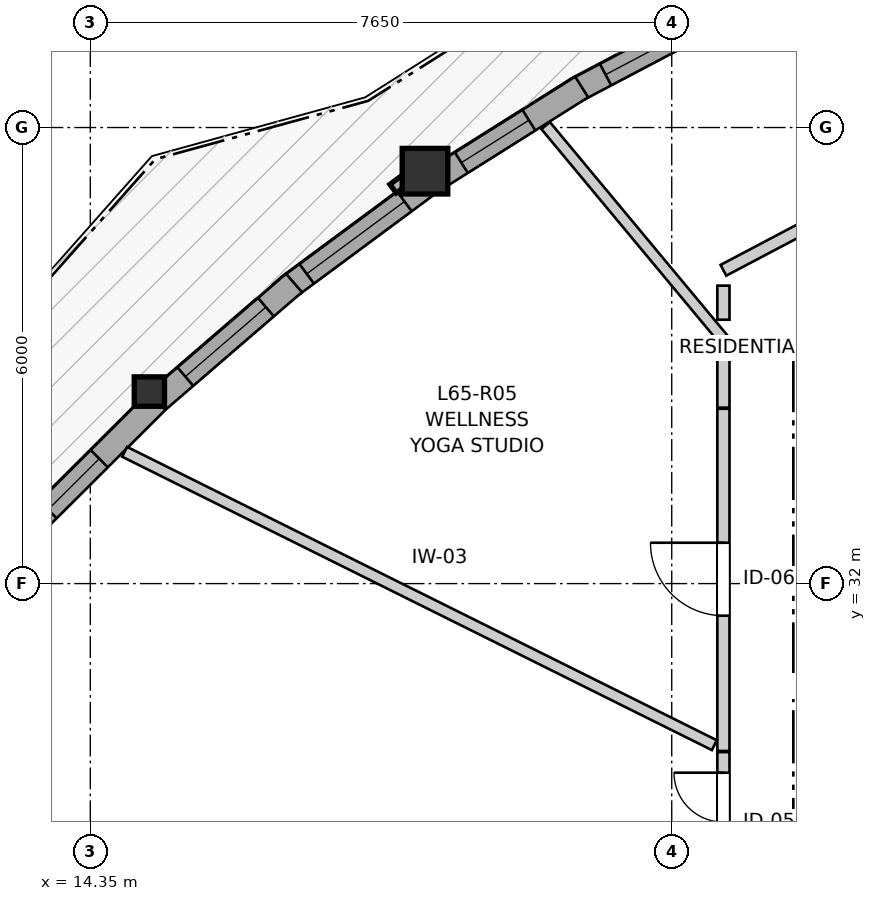
"""IFC4 building model, lengths in metres.
Left out: names, types, materials, properties, quantities, classifications, styles, units other than length and angle.
Written with IfcOpenShell. Run it as: python <this file> out.ifc"""

import sys

from ifc_helpers import new_model, si_unit, direction, frame, frame_2d, origin, origin_2d, place, context, subcontext, project, spatial, rectangle, i_section, extrude, source, transform, mapped, element, fill, save


model = new_model("IFC4")
c1 = context("Model", 3, precision=1e-05, world=origin(), true_north=direction((0.0, 1.0)))
c2 = subcontext(c1, "Body", "Model", "MODEL_VIEW")
j1 = project(units=[si_unit("LENGTHUNIT", "METRE"), si_unit("PLANEANGLEUNIT", "RADIAN")], contexts=[c1])
p1 = place(None, origin())
s1 = spatial("IfcSite", under=j1, at=p1, CompositionType="ELEMENT")
p2 = place(p1, origin())
s2 = spatial("IfcBuilding", under=s1, at=p2, CompositionType="ELEMENT")
p3 = place(p2, frame((0.0, 0.0, 218.0)))
s3 = spatial("IfcBuildingStorey", under=s2, at=p3, CompositionType="ELEMENT", Elevation=218.0)
m1 = source(origin(), c2, "Body", "SweptSolid", [
    extrude(rectangle(XDim=0.6, YDim=0.6, at=origin_2d()), origin(), (0.0, 0.0, 1.0), 2.96),
])
p4 = place(p3, frame((18.753, 37.426, 0.0), z_axis=(0.0, 0.0, 1.0), x_axis=(1.0, 0.0, 0.0)))
e1 = element("IfcColumn", 1, at=p4, inside=s3, PredefinedType="COLUMN", context=c2, shape_type="MappedRepresentation", body=[
    mapped(m1, transform((0.0, 0.0, 0.0), x_axis=(1.0, 0.0, 0.0), y_axis=(0.0, 1.0, 0.0), z_axis=(0.0, 0.0, 1.0), scale=1.0)),
])
m2 = source(origin(), c2, "Body", "SweptSolid", [
    extrude(i_section(OverallWidth=0.398, OverallDepth=0.387, WebThickness=0.019, FlangeThickness=0.03, FilletRadius=0.015, at=origin_2d()), origin(), (0.0, 0.0, 1.0), 2.96),
])
p5 = place(p3, frame((15.127, 34.526, 0.0), z_axis=(0.0, 0.0, 1.0), x_axis=(1.0, 0.0, 0.0)))
e2 = element("IfcColumn", 2, at=p5, inside=s3, PredefinedType="PILASTER", context=c2, shape_type="MappedRepresentation", body=[
    mapped(m2, transform((0.0, 0.0, 0.0), x_axis=(1.0, 0.0, 0.0), y_axis=(0.0, 1.0, 0.0), z_axis=(0.0, 0.0, 1.0), scale=1.0)),
])
p6 = place(p3, frame((22.785, 39.57, 0.0), z_axis=(0.0, 0.0, 1.0), x_axis=(-0.884379914657, -0.466767786541, 0.0)))
e3 = element("IfcWall", 3, at=p6, inside=s3, PredefinedType="SOLIDWALL", context=c2, shape_type="SweptSolid", body=[
    extrude(rectangle(XDim=2.314, YDim=0.32, at=frame_2d((1.157, 0.0))), origin(), (0.0, 0.0, 1.0), 2.58),
])
p7 = place(p6, frame((0.422, 0.0, 0.82)))
e4 = element("IfcOpeningElement", 4, at=p7, cuts=e3, PredefinedType="OPENING", context=c2, shape_type="SweptSolid", body=[
    extrude(rectangle(XDim=1.45, YDim=1.25, at=frame_2d((0.725, 0.625))), frame((0.0, 0.17, 0.0), z_axis=(0.0, -1.0, 0.0), x_axis=(1.0, 0.0, 0.0)), (0.0, 0.0, 1.0), 0.34),
])
p8 = place(p3, frame((20.815, 38.533, 0.0), z_axis=(0.0, 0.0, 1.0), x_axis=(-0.846418054627, -0.532518991963, 0.0)))
e5 = element("IfcWall", 5, at=p8, inside=s3, PredefinedType="SOLIDWALL", context=c2, shape_type="SweptSolid", body=[
    extrude(rectangle(XDim=2.245, YDim=0.32, at=frame_2d((1.122, 0.0))), origin(), (0.0, 0.0, 1.0), 2.58),
])
p9 = place(p8, frame((0.82, 0.0, 0.82)))
e6 = element("IfcOpeningElement", 6, at=p9, cuts=e5, PredefinedType="OPENING", context=c2, shape_type="SweptSolid", body=[
    extrude(rectangle(XDim=1.05, YDim=1.45, at=frame_2d((0.525, 0.725))), frame((0.0, 0.17, 0.0), z_axis=(0.0, -1.0, 0.0), x_axis=(1.0, 0.0, 0.0)), (0.0, 0.0, 1.0), 0.34),
])
p10 = place(p3, frame((18.776, 37.243, 0.0), z_axis=(0.0, 0.0, 1.0), x_axis=(-0.803798468353, -0.594901691267, 0.0)))
e7 = element("IfcWall", 7, at=p10, inside=s3, PredefinedType="SOLIDWALL", context=c2, shape_type="SweptSolid", body=[
    extrude(rectangle(XDim=2.258, YDim=0.32, at=frame_2d((1.129, 0.0))), origin(), (0.0, 0.0, 1.0), 2.58),
])
p11 = place(p10, frame((0.364, 0.0, 0.82)))
e8 = element("IfcOpeningElement", 8, at=p11, cuts=e7, PredefinedType="OPENING", context=c2, shape_type="SweptSolid", body=[
    extrude(rectangle(XDim=1.6, YDim=1.35, at=frame_2d((0.8, 0.675))), frame((0.0, 0.17, 0.0), z_axis=(0.0, -1.0, 0.0), x_axis=(1.0, 0.0, 0.0)), (0.0, 0.0, 1.0), 0.34),
])
p12 = place(p3, frame((17.03, 35.955, 0.0), z_axis=(0.0, 0.0, 1.0), x_axis=(-0.757489541562, -0.652847297937, 0.0)))
e9 = element("IfcWall", 9, at=p12, inside=s3, PredefinedType="SOLIDWALL", context=c2, shape_type="SweptSolid", body=[
    extrude(rectangle(XDim=2.354, YDim=0.32, at=frame_2d((1.177, 0.0))), origin(), (0.0, 0.0, 1.0), 2.58),
])
p13 = place(p12, frame((0.487, 0.0, 0.82)))
e10 = element("IfcOpeningElement", 10, at=p13, cuts=e9, PredefinedType="OPENING", context=c2, shape_type="SweptSolid", body=[
    extrude(rectangle(XDim=1.4, YDim=1.35, at=frame_2d((0.7, 0.675))), frame((0.0, 0.17, 0.0), z_axis=(0.0, -1.0, 0.0), x_axis=(1.0, 0.0, 0.0)), (0.0, 0.0, 1.0), 0.34),
])
p14 = place(p3, frame((15.226, 34.399, 0.0), z_axis=(0.0, 0.0, 1.0), x_axis=(-0.708431997636, -0.705779076429, 0.0)))
e11 = element("IfcWall", 11, at=p14, inside=s3, PredefinedType="SOLIDWALL", context=c2, shape_type="SweptSolid", body=[
    extrude(rectangle(XDim=2.393, YDim=0.32, at=frame_2d((1.196, 0.0))), origin(), (0.0, 0.0, 1.0), 2.58),
])
p15 = place(p14, frame((1.07, 0.0, 0.82)))
e12 = element("IfcOpeningElement", 12, at=p15, cuts=e11, PredefinedType="OPENING", context=c2, shape_type="SweptSolid", body=[
    extrude(rectangle(XDim=0.95, YDim=1.35, at=frame_2d((0.475, 0.675))), frame((0.0, 0.17, 0.0), z_axis=(0.0, -1.0, 0.0), x_axis=(1.0, 0.0, 0.0)), (0.0, 0.0, 1.0), 0.34),
])
p16 = place(p3, frame((22.68, 29.798, 0.0), z_axis=(0.0, 0.0, 1.0), x_axis=(0.0, 1.0, 0.0)))
e13 = element("IfcWall", 13, at=p16, inside=s3, PredefinedType="PARTITIONING", context=c2, shape_type="SweptSolid", body=[
    extrude(rectangle(XDim=4.502, YDim=0.16, at=frame_2d((2.251, 0.0))), origin(), (0.0, 0.0, 1.0), 2.96),
])
p17 = place(p16, frame((1.78, 0.0, 0.0)))
e14 = element("IfcOpeningElement", 14, at=p17, cuts=e13, PredefinedType="OPENING", context=c2, shape_type="SweptSolid", body=[
    extrude(rectangle(XDim=0.96, YDim=2.1, at=frame_2d((0.48, 1.05))), frame((0.0, 0.09, 0.0), z_axis=(0.0, -1.0, 0.0), x_axis=(1.0, 0.0, 0.0)), (0.0, 0.0, 1.0), 0.18),
])
p18 = place(p3, frame((22.68, 27.85, 0.0), z_axis=(0.0, 0.0, 1.0), x_axis=(0.0, 1.0, 0.0)))
e15 = element("IfcWall", 15, at=p18, inside=s3, PredefinedType="PARTITIONING", context=c2, shape_type="SweptSolid", body=[
    extrude(rectangle(XDim=1.933, YDim=0.16, at=frame_2d((0.966, 0.0))), origin(), (0.0, 0.0, 1.0), 2.96),
])
p19 = place(p18, frame((0.362, 0.0, 0.0)))
e16 = element("IfcOpeningElement", 16, at=p19, cuts=e15, PredefinedType="OPENING", context=c2, shape_type="SweptSolid", body=[
    extrude(rectangle(XDim=1.3, YDim=2.1, at=frame_2d((0.65, 1.05))), frame((0.0, 0.09, 0.0), z_axis=(0.0, -1.0, 0.0), x_axis=(1.0, 0.0, 0.0)), (0.0, 0.0, 1.0), 0.18),
])
p20 = place(p3, frame((14.802, 33.734, 0.0), z_axis=(0.0, 0.0, 1.0), x_axis=(0.895354955696, -0.445353234311, 0.0)))
e17 = element("IfcWall", 17, at=p20, inside=s3, PredefinedType="PARTITIONING", context=c2, shape_type="SweptSolid", body=[
    extrude(rectangle(XDim=8.666, YDim=0.145, at=frame_2d((4.333, 0.0))), origin(), (0.0, 0.0, 1.0), 2.96),
])
p21 = place(p3, frame((20.341, 38.025, 0.0), z_axis=(0.0, 0.0, 1.0), x_axis=(0.639731122463, -0.768598784121, 0.0)))
e18 = element("IfcWall", 18, at=p21, inside=s3, PredefinedType="PARTITIONING", context=c2, shape_type="SweptSolid", body=[
    extrude(rectangle(XDim=3.656, YDim=0.145, at=frame_2d((1.828, 0.0))), origin(), (0.0, 0.0, 1.0), 2.96),
])
p22 = place(p3, frame((22.68, 36.122, 0.0), z_axis=(0.0, 0.0, 1.0), x_axis=(0.884468554818, 0.466599802335, 0.0)))
e19 = element("IfcWall", 19, at=p22, inside=s3, PredefinedType="PARTITIONING", context=c2, shape_type="SweptSolid", body=[
    extrude(rectangle(XDim=1.603, YDim=0.16, at=frame_2d((0.802, 0.0))), origin(), (0.0, 0.0, 1.0), 2.96),
])
p23 = place(p3, frame((22.68, 34.315, 0.0), z_axis=(0.0, 0.0, 1.0), x_axis=(0.0, 1.0, 0.0)))
e20 = element("IfcWall", 20, at=p23, inside=s3, PredefinedType="PARTITIONING", context=c2, shape_type="SweptSolid", body=[
    extrude(rectangle(XDim=0.707, YDim=0.16, at=frame_2d((0.353, 0.0))), origin(), (0.0, 0.0, 1.0), 2.96),
])
p24 = place(p3, frame((22.68, 35.471, 0.0), z_axis=(0.0, 0.0, 1.0), x_axis=(0.0, 1.0, 0.0)))
e21 = element("IfcWall", 21, at=p24, inside=s3, PredefinedType="PARTITIONING", context=c2, shape_type="SweptSolid", body=[
    extrude(rectangle(XDim=0.448, YDim=0.16, at=frame_2d((0.224, 0.0))), origin(), (0.0, 0.0, 1.0), 2.96),
])
m3 = source(origin(), c2, "Body", "SweptSolid", [
    extrude(rectangle(XDim=1.45, YDim=1.25, at=frame_2d((0.725, 0.625))), frame((0.0, 0.03, 0.0), z_axis=(0.0, -1.0, 0.0), x_axis=(1.0, 0.0, 0.0)), (0.0, 0.0, 1.0), 0.06),
])
p25 = place(p7, origin())
e22 = element("IfcWindow", 22, at=p25, inside=s3, PartitioningType="SINGLE_PANEL", PredefinedType="WINDOW", context=c2, shape_type="MappedRepresentation", body=[
    mapped(m3, transform((0.0, 0.0, 0.0), x_axis=(1.0, 0.0, 0.0), y_axis=(0.0, 1.0, 0.0), z_axis=(0.0, 0.0, 1.0), scale=1.0)),
])
fill(e4, e22)
m4 = source(origin(), c2, "Body", "SweptSolid", [
    extrude(rectangle(XDim=1.05, YDim=1.45, at=frame_2d((0.525, 0.725))), frame((0.0, 0.03, 0.0), z_axis=(0.0, -1.0, 0.0), x_axis=(1.0, 0.0, 0.0)), (0.0, 0.0, 1.0), 0.06),
])
p26 = place(p9, origin())
e23 = element("IfcWindow", 23, at=p26, inside=s3, PartitioningType="SINGLE_PANEL", PredefinedType="WINDOW", context=c2, shape_type="MappedRepresentation", body=[
    mapped(m4, transform((0.0, 0.0, 0.0), x_axis=(1.0, 0.0, 0.0), y_axis=(0.0, 1.0, 0.0), z_axis=(0.0, 0.0, 1.0), scale=1.0)),
])
fill(e6, e23)
m5 = source(origin(), c2, "Body", "SweptSolid", [
    extrude(rectangle(XDim=1.6, YDim=1.35, at=frame_2d((0.8, 0.675))), frame((0.0, 0.03, 0.0), z_axis=(0.0, -1.0, 0.0), x_axis=(1.0, 0.0, 0.0)), (0.0, 0.0, 1.0), 0.06),
])
p27 = place(p11, origin())
e24 = element("IfcWindow", 24, at=p27, inside=s3, PartitioningType="SINGLE_PANEL", PredefinedType="WINDOW", context=c2, shape_type="MappedRepresentation", body=[
    mapped(m5, transform((0.0, 0.0, 0.0), x_axis=(1.0, 0.0, 0.0), y_axis=(0.0, 1.0, 0.0), z_axis=(0.0, 0.0, 1.0), scale=1.0)),
])
fill(e8, e24)
m6 = source(origin(), c2, "Body", "SweptSolid", [
    extrude(rectangle(XDim=1.4, YDim=1.35, at=frame_2d((0.7, 0.675))), frame((0.0, 0.03, 0.0), z_axis=(0.0, -1.0, 0.0), x_axis=(1.0, 0.0, 0.0)), (0.0, 0.0, 1.0), 0.06),
])
p28 = place(p13, origin())
e25 = element("IfcWindow", 25, at=p28, inside=s3, PartitioningType="SINGLE_PANEL", PredefinedType="WINDOW", context=c2, shape_type="MappedRepresentation", body=[
    mapped(m6, transform((0.0, 0.0, 0.0), x_axis=(1.0, 0.0, 0.0), y_axis=(0.0, 1.0, 0.0), z_axis=(0.0, 0.0, 1.0), scale=1.0)),
])
fill(e10, e25)
m7 = source(origin(), c2, "Body", "SweptSolid", [
    extrude(rectangle(XDim=0.95, YDim=1.35, at=frame_2d((0.475, 0.675))), frame((0.0, 0.03, 0.0), z_axis=(0.0, -1.0, 0.0), x_axis=(1.0, 0.0, 0.0)), (0.0, 0.0, 1.0), 0.06),
])
p29 = place(p15, origin())
e26 = element("IfcWindow", 26, at=p29, inside=s3, PartitioningType="SINGLE_PANEL", PredefinedType="WINDOW", context=c2, shape_type="MappedRepresentation", body=[
    mapped(m7, transform((0.0, 0.0, 0.0), x_axis=(1.0, 0.0, 0.0), y_axis=(0.0, 1.0, 0.0), z_axis=(0.0, 0.0, 1.0), scale=1.0)),
])
fill(e12, e26)
m8 = source(origin(), c2, "Body", "SweptSolid", [
    extrude(rectangle(XDim=0.96, YDim=2.1, at=frame_2d((0.48, 1.05))), frame((0.0, 0.025, 0.0), z_axis=(0.0, -1.0, 0.0), x_axis=(1.0, 0.0, 0.0)), (0.0, 0.0, 1.0), 0.05),
])
p30 = place(p17, origin())
e27 = element("IfcDoor", 27, at=p30, inside=s3, OperationType="SINGLE_SWING_RIGHT", PredefinedType="DOOR", context=c2, shape_type="MappedRepresentation", body=[
    mapped(m8, transform((0.0, 0.0, 0.0), x_axis=(1.0, 0.0, 0.0), y_axis=(0.0, 1.0, 0.0), z_axis=(0.0, 0.0, 1.0), scale=1.0)),
])
fill(e14, e27)
m9 = source(origin(), c2, "Body", "SweptSolid", [
    extrude(rectangle(XDim=1.3, YDim=2.1, at=frame_2d((0.65, 1.05))), frame((0.0, 0.025, 0.0), z_axis=(0.0, -1.0, 0.0), x_axis=(1.0, 0.0, 0.0)), (0.0, 0.0, 1.0), 0.05),
])
p31 = place(p19, origin())
e28 = element("IfcDoor", 28, at=p31, inside=s3, OperationType="DOUBLE_DOOR_SINGLE_SWING", PredefinedType="DOOR", context=c2, shape_type="MappedRepresentation", body=[
    mapped(m9, transform((0.0, 0.0, 0.0), x_axis=(1.0, 0.0, 0.0), y_axis=(0.0, 1.0, 0.0), z_axis=(0.0, 0.0, 1.0), scale=1.0)),
])
fill(e16, e28)
save(model, sys.argv[1])
